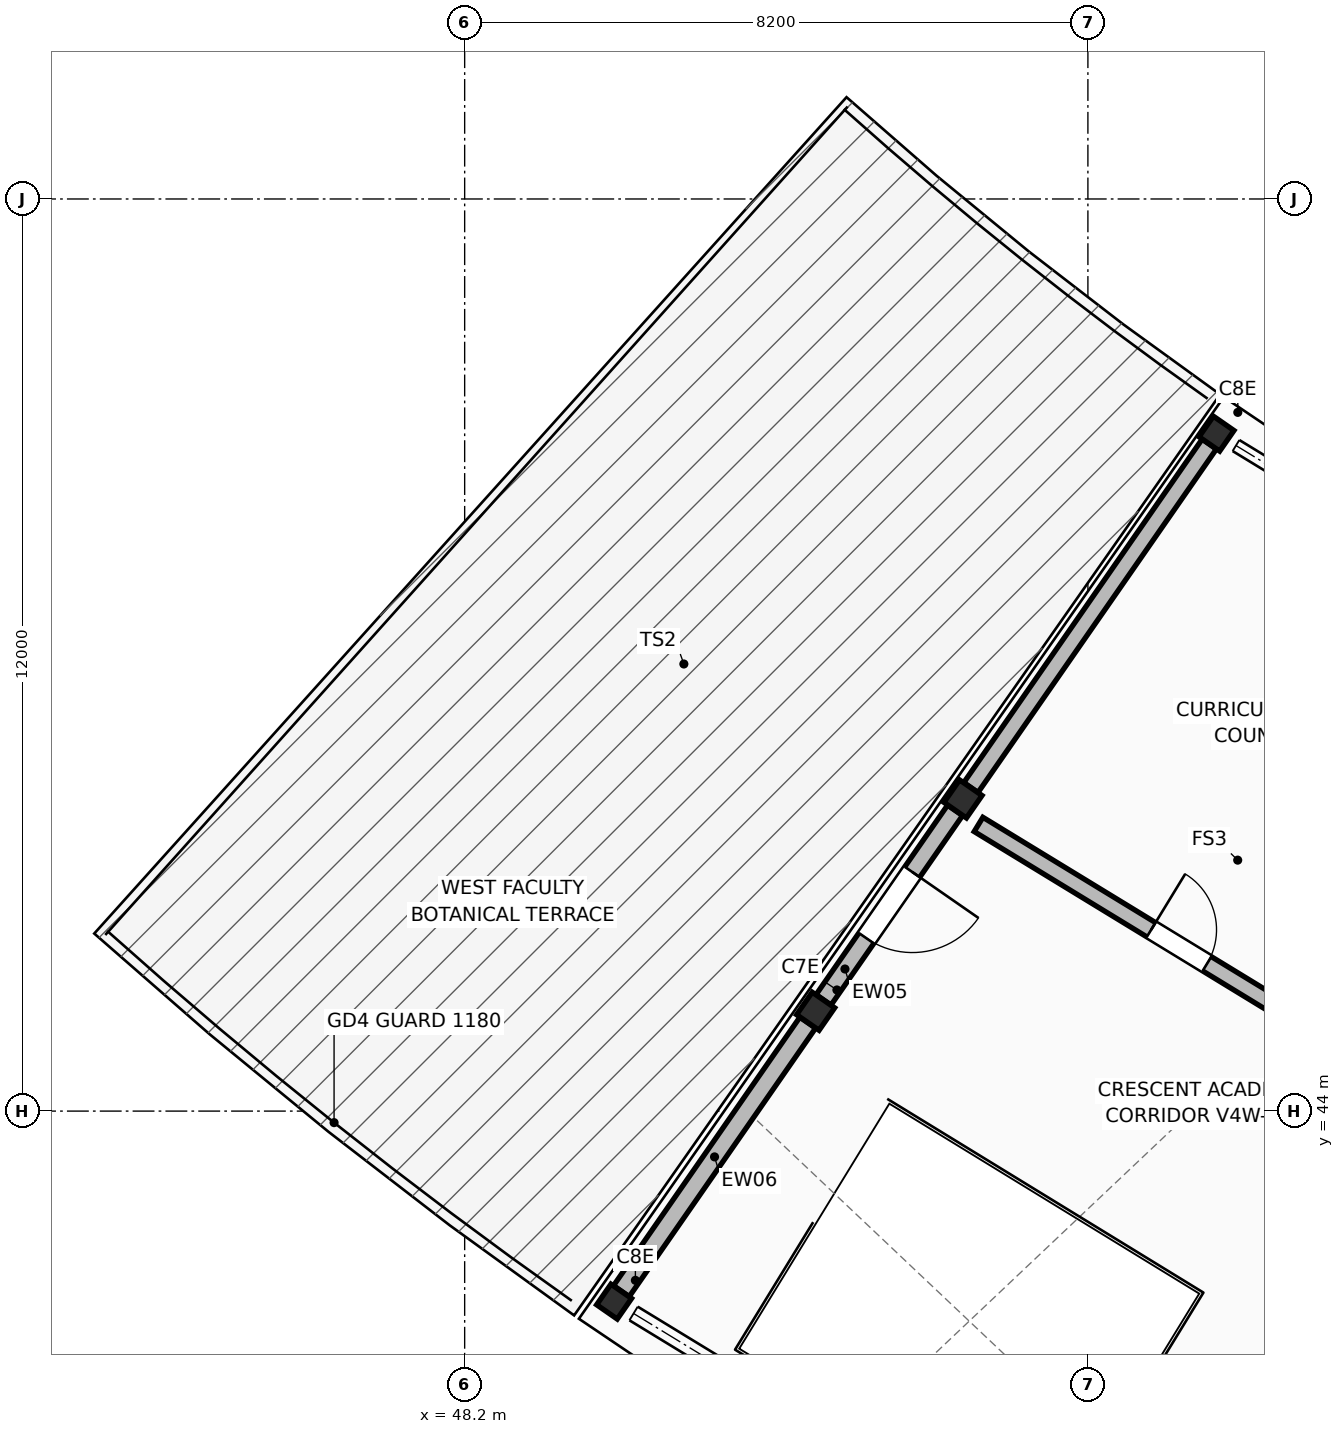
"""IFC4 building model, lengths in metres.
Left out: names, types, materials, properties, quantities, classifications, styles, units other than length and angle.
Written with IfcOpenShell. Run it as: python <this file> out.ifc"""

import sys

from ifc_helpers import new_model, si_unit, direction, frame, frame_2d, origin, origin_2d, place, context, subcontext, project, spatial, rectangle, extrude, element, fill, save


model = new_model("IFC4")
c1 = context("Model", 3, precision=1e-05, world=origin(), true_north=direction((0.0, 1.0)))
c2 = subcontext(c1, "Body", "Model", "MODEL_VIEW")
j1 = project(units=[si_unit("LENGTHUNIT", "METRE"), si_unit("PLANEANGLEUNIT", "RADIAN")], contexts=[c1])
p1 = place(None, origin())
s1 = spatial("IfcSite", under=j1, at=p1, CompositionType="ELEMENT")
p2 = place(p1, origin())
s2 = spatial("IfcBuilding", under=s1, at=p2, CompositionType="ELEMENT")
p3 = place(p2, frame((0.0, 0.0, 15.64)))
s3 = spatial("IfcBuildingStorey", under=s2, at=p3, CompositionType="ELEMENT", Elevation=15.64)
p4 = place(p3, frame((58.092, 52.913, 0.0), z_axis=(0.0, 0.0, 1.0), x_axis=(-0.570283536751, -0.821447921484, 0.0)))
e1 = element("IfcColumn", 1, at=p4, inside=s3, PredefinedType="COLUMN", context=c2, shape_type="SweptSolid", body=[
    extrude(rectangle(XDim=0.33, YDim=0.33, at=origin_2d()), origin(), (0.0, 0.0, 1.0), 3.74),
])
for number, where, z_axis, x_axis in (
    (2, (54.757, 48.107, 0.0), (0.0, 0.0, 1.0), (-0.57, -0.821, 0.0)),
    (3, (52.818, 45.314, 0.0), (0.0, 0.0, 1.0), (-0.57, -0.821, 0.0)),
):
    element("IfcColumn", number, at=place(p3, frame(where, z_axis=z_axis, x_axis=x_axis)), inside=s3, PredefinedType="COLUMN", context=c2, shape_type="SweptSolid", body=[
        extrude(rectangle(XDim=0.36, YDim=0.36, at=origin_2d()), origin(), (0.0, 0.0, 1.0), 3.74),
    ])
p5 = place(p3, frame((50.166, 41.494, 0.0), z_axis=(0.0, 0.0, 1.0), x_axis=(-0.570283536751, -0.821447921484, 0.0)))
e4 = element("IfcColumn", 4, at=p5, inside=s3, PredefinedType="COLUMN", context=c2, shape_type="SweptSolid", body=[
    extrude(rectangle(XDim=0.33, YDim=0.33, at=origin_2d()), origin(), (0.0, 0.0, 1.0), 3.74),
])
p6 = place(p3, frame((57.997, 52.774, 0.0), z_axis=(0.0, 0.0, 1.0), x_axis=(-0.570236884325, -0.821480307588, 0.0)))
e5 = element("IfcWall", 5, at=p6, inside=s3, PredefinedType="STANDARD", context=c2, shape_type="SweptSolid", body=[
    extrude(rectangle(XDim=5.499, YDim=0.228, at=frame_2d((2.75, 0.0))), origin(), (0.0, 0.0, 1.0), 2.82),
])
p7 = place(p3, frame((54.652, 47.957, 0.0), z_axis=(0.0, 0.0, 1.0), x_axis=(-0.570201261131, -0.821505034559, 0.0)))
e6 = element("IfcWall", 6, at=p7, inside=s3, PredefinedType="STANDARD", context=c2, shape_type="SweptSolid", body=[
    extrude(rectangle(XDim=3.034, YDim=0.24, at=frame_2d((1.517, 0.0))), origin(), (0.0, 0.0, 1.0), 2.82),
])
p8 = place(p7, frame((0.987, 0.0, 0.0)))
e7 = element("IfcOpeningElement", 7, at=p8, cuts=e6, PredefinedType="OPENING", context=c2, shape_type="SweptSolid", body=[
    extrude(rectangle(XDim=1.06, YDim=2.18, at=frame_2d((0.53, 1.09))), frame((0.0, 0.13, 0.0), z_axis=(0.0, -1.0, 0.0), x_axis=(1.0, 0.0, 0.0)), (0.0, 0.0, 1.0), 0.26),
])
p9 = place(p3, frame((52.713, 45.163, 0.0), z_axis=(0.0, 0.0, 1.0), x_axis=(-0.570237221937, -0.821480073232, 0.0)))
e8 = element("IfcWall", 8, at=p9, inside=s3, PredefinedType="STANDARD", context=c2, shape_type="SweptSolid", body=[
    extrude(rectangle(XDim=4.299, YDim=0.252, at=frame_2d((2.149, 0.0))), origin(), (0.0, 0.0, 1.0), 2.82),
])
p10 = place(p3, frame((54.961, 47.771, 0.0), z_axis=(0.0, 0.0, 1.0), x_axis=(0.853713092051, -0.520743657148, 0.0)))
e9 = element("IfcWall", 9, at=p10, inside=s3, PredefinedType="STANDARD", context=c2, shape_type="SweptSolid", body=[
    extrude(rectangle(XDim=6.181, YDim=0.22, at=frame_2d((3.091, 0.0))), origin(), (0.0, 0.0, 1.0), 2.76),
])
p11 = place(p10, frame((2.66, 0.0, 0.0)))
e10 = element("IfcOpeningElement", 10, at=p11, cuts=e9, PredefinedType="OPENING", context=c2, shape_type="SweptSolid", body=[
    extrude(rectangle(XDim=0.86, YDim=2.06, at=frame_2d((0.43, 1.03))), frame((0.0, 0.12, 0.0), z_axis=(0.0, -1.0, 0.0), x_axis=(1.0, 0.0, 0.0)), (0.0, 0.0, 1.0), 0.24),
])
p12 = place(p8, frame((1.06, 0.0, 0.0), z_axis=(0.0, 0.0, 1.0), x_axis=(-1.0, 0.0, 0.0)))
e11 = element("IfcDoor", 11, at=p12, inside=s3, OperationType="SINGLE_SWING_LEFT", PredefinedType="DOOR", context=c2, shape_type="SweptSolid", body=[
    extrude(rectangle(XDim=1.06, YDim=2.18, at=frame_2d((0.53, 1.09))), frame((0.0, 0.025, 0.0), z_axis=(0.0, -1.0, 0.0), x_axis=(1.0, 0.0, 0.0)), (0.0, 0.0, 1.0), 0.05),
])
fill(e7, e11)
p13 = place(p11, frame((0.86, 0.0, 0.0), z_axis=(0.0, 0.0, 1.0), x_axis=(-1.0, 0.0, 0.0)))
e12 = element("IfcDoor", 12, at=p13, inside=s3, OperationType="SINGLE_SWING_LEFT", PredefinedType="DOOR", context=c2, shape_type="SweptSolid", body=[
    extrude(rectangle(XDim=0.86, YDim=2.06, at=frame_2d((0.43, 1.03))), frame((0.0, 0.025, 0.0), z_axis=(0.0, -1.0, 0.0), x_axis=(1.0, 0.0, 0.0)), (0.0, 0.0, 1.0), 0.05),
])
fill(e10, e12)
save(model, sys.argv[1])
